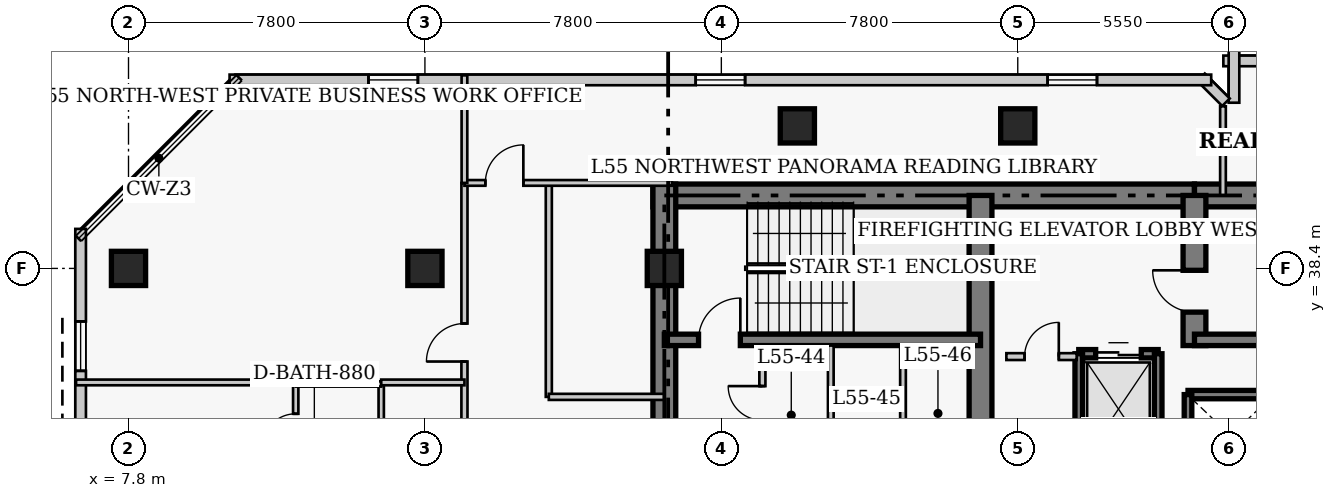
"""IFC4 building model, lengths in metres.
Left out: names, types, materials, properties, quantities, classifications, styles, units other than length and angle.
Written with IfcOpenShell. Run it as: python <this file> out.ifc"""

import sys

from ifc_helpers import new_model, si_unit, direction, frame, frame_2d, origin, origin_2d, place, context, subcontext, project, spatial, rectangle, extrude, element, fill, save


model = new_model("IFC4")
c1 = context("Model", 3, precision=1e-05, world=origin(), true_north=direction((0.0, 1.0)))
c2 = subcontext(c1, "Body", "Model", "MODEL_VIEW")
j1 = project(units=[si_unit("LENGTHUNIT", "METRE"), si_unit("PLANEANGLEUNIT", "RADIAN")], contexts=[c1])
p1 = place(None, origin())
s1 = spatial("IfcSite", under=j1, at=p1, CompositionType="ELEMENT")
p2 = place(p1, origin())
s2 = spatial("IfcBuilding", under=s1, at=p2, CompositionType="ELEMENT")
p3 = place(p2, frame((0.0, 0.0, 220.2)))
s3 = spatial("IfcBuildingStorey", under=s2, at=p3, CompositionType="ELEMENT", Elevation=220.2)
p4 = place(p3, frame((21.6, 40.32, 0.0), z_axis=(0.0, 0.0, 1.0), x_axis=(1.0, 0.0, 0.0)))
e1 = element("IfcWall", 1, at=p4, inside=s3, PredefinedType="SHEAR", context=c2, shape_type="SweptSolid", body=[
    extrude(rectangle(XDim=14.25, YDim=0.6, at=frame_2d((7.125, 0.0))), origin(), (0.0, 0.0, 1.0), 3.9),
])
p5 = place(p3, frame((35.85, 40.32, 0.0), z_axis=(0.0, 0.0, 1.0), x_axis=(1.0, 0.0, 0.0)))
e2 = element("IfcWall", 2, at=p5, inside=s3, PredefinedType="SHEAR", context=c2, shape_type="SweptSolid", body=[
    extrude(rectangle(XDim=12.6, YDim=0.6, at=frame_2d((6.3, 0.0))), origin(), (0.0, 0.0, 1.0), 3.9),
])
p6 = place(p3, frame((21.9, 27.05, 0.0), z_axis=(0.0, 0.0, 1.0), x_axis=(0.0, 1.0, 0.0)))
e3 = element("IfcWall", 3, at=p6, inside=s3, PredefinedType="SHEAR", context=c2, shape_type="SweptSolid", body=[
    extrude(rectangle(XDim=13.57, YDim=0.6, at=frame_2d((6.785, 0.0))), origin(), (0.0, 0.0, 1.0), 3.9),
])
p7 = place(p3, frame((30.22, 33.05, 0.0), z_axis=(0.0, 0.0, 1.0), x_axis=(0.0, 1.0, 0.0)))
e4 = element("IfcWall", 4, at=p7, inside=s3, PredefinedType="SHEAR", context=c2, shape_type="SweptSolid", body=[
    extrude(rectangle(XDim=7.27, YDim=0.6, at=frame_2d((3.635, 0.0))), origin(), (0.0, 0.0, 1.0), 3.9),
])
p8 = place(p3, frame((35.85, 36.37, 0.0), z_axis=(0.0, 0.0, 1.0), x_axis=(0.0, 1.0, 0.0)))
e5 = element("IfcWall", 5, at=p8, inside=s3, PredefinedType="SHEAR", context=c2, shape_type="SweptSolid", body=[
    extrude(rectangle(XDim=3.95, YDim=0.6, at=frame_2d((1.975, 0.0))), origin(), (0.0, 0.0, 1.0), 3.9),
])
p9 = place(p8, frame((0.88, 0.0, 0.0)))
e6 = element("IfcOpeningElement", 6, at=p9, cuts=e5, PredefinedType="OPENING", context=c2, shape_type="SweptSolid", body=[
    extrude(rectangle(XDim=1.1, YDim=2.15, at=frame_2d((0.55, 1.075))), frame((0.0, 0.31, 0.0), z_axis=(0.0, -1.0, 0.0), x_axis=(1.0, 0.0, 0.0)), (0.0, 0.0, 1.0), 0.62),
])
p10 = place(p3, frame((21.9, 36.52, 0.0), z_axis=(0.0, 0.0, 1.0), x_axis=(1.0, 0.0, 0.0)))
e7 = element("IfcWall", 7, at=p10, inside=s3, PredefinedType="SHEAR", context=c2, shape_type="SweptSolid", body=[
    extrude(rectangle(XDim=8.32, YDim=0.3, at=frame_2d((4.16, 0.0))), origin(), (0.0, 0.0, 1.0), 3.9),
])
p11 = place(p10, frame((0.9, 0.0, 0.0)))
e8 = element("IfcOpeningElement", 8, at=p11, cuts=e7, PredefinedType="OPENING", context=c2, shape_type="SweptSolid", body=[
    extrude(rectangle(XDim=1.1, YDim=2.15, at=frame_2d((0.55, 1.075))), frame((0.0, 0.16, 0.0), z_axis=(0.0, -1.0, 0.0), x_axis=(1.0, 0.0, 0.0)), (0.0, 0.0, 1.0), 0.32),
])
p12 = place(p3, frame((35.85, 36.52, 0.0), z_axis=(0.0, 0.0, 1.0), x_axis=(1.0, 0.0, 0.0)))
e9 = element("IfcWall", 9, at=p12, inside=s3, PredefinedType="SHEAR", context=c2, shape_type="SweptSolid", body=[
    extrude(rectangle(XDim=8.33, YDim=0.3, at=frame_2d((4.165, 0.0))), origin(), (0.0, 0.0, 1.0), 3.9),
])
for number, where, z_axis, x_axis in (
    (10, (7.8, 38.4, 0.0), (0.0, 0.0, 1.0), (1.0, 0.0, 0.0)),
    (11, (15.6, 38.4, 0.0), (0.0, 0.0, 1.0), (1.0, 0.0, 0.0)),
    (12, (21.9, 38.4, 0.0), (0.0, 0.0, 1.0), (1.0, 0.0, 0.0)),
    (13, (25.4, 42.15, 0.0), (0.0, 0.0, 1.0), (1.0, 0.0, 0.0)),
    (14, (31.2, 42.15, 0.0), (0.0, 0.0, 1.0), (1.0, 0.0, 0.0)),
):
    element("IfcColumn", number, at=place(p3, frame(where, z_axis=z_axis, x_axis=x_axis)), inside=s3, PredefinedType="COLUMN", context=c2, shape_type="SweptSolid", body=[
        extrude(rectangle(XDim=0.9, YDim=0.9, at=origin_2d()), origin(), (0.0, 0.0, 1.0), 3.9),
    ])
p13 = place(p3, frame((41.39, 43.86, 0.0), z_axis=(0.0, 0.0, 1.0), x_axis=(-1.0, 0.0, 0.0)))
e15 = element("IfcWall", 15, at=p13, inside=s3, PredefinedType="SOLIDWALL", context=c2, shape_type="SweptSolid", body=[
    extrude(rectangle(XDim=4.78, YDim=0.28, at=frame_2d((2.39, 0.0))), origin(), (0.0, 0.0, 1.0), 3.65),
])
p14 = place(p13, frame((1.74, 0.0, 0.85)))
e16 = element("IfcOpeningElement", 16, at=p14, cuts=e15, PredefinedType="OPENING", context=c2, shape_type="SweptSolid", body=[
    extrude(rectangle(XDim=1.3, YDim=1.7, at=frame_2d((0.65, 0.85))), frame((0.0, 0.15, 0.0), z_axis=(0.0, -1.0, 0.0), x_axis=(1.0, 0.0, 0.0)), (0.0, 0.0, 1.0), 0.3),
])
p15 = place(p3, frame((36.89, 44.14, 0.0), z_axis=(0.0, 0.0, 1.0), x_axis=(0.0, -1.0, 0.0)))
e17 = element("IfcWall", 17, at=p15, inside=s3, PredefinedType="SOLIDWALL", context=c2, shape_type="SweptSolid", body=[
    extrude(rectangle(XDim=1.38, YDim=0.28, at=frame_2d((0.69, 0.0))), origin(), (0.0, 0.0, 1.0), 3.65),
])
p16 = place(p3, frame((36.679, 42.773, 0.0), z_axis=(0.0, 0.0, 1.0), x_axis=(-0.707106781187, 0.707106781187, 0.0)))
e18 = element("IfcWall", 18, at=p16, inside=s3, PredefinedType="SOLIDWALL", context=c2, shape_type="SweptSolid", body=[
    extrude(rectangle(XDim=0.928, YDim=0.28, at=frame_2d((0.464, 0.0))), origin(), (0.0, 0.0, 1.0), 3.65),
])
p17 = place(p3, frame((36.29, 43.36, 0.0), z_axis=(0.0, 0.0, 1.0), x_axis=(-1.0, 0.0, 0.0)))
e19 = element("IfcWall", 19, at=p17, inside=s3, PredefinedType="SOLIDWALL", context=c2, shape_type="SweptSolid", body=[
    extrude(rectangle(XDim=25.83, YDim=0.28, at=frame_2d((12.915, 0.0))), origin(), (0.0, 0.0, 1.0), 3.65),
])
p18 = place(p17, frame((3.005, 0.0, 0.85)))
e20 = element("IfcOpeningElement", 20, at=p18, cuts=e19, PredefinedType="OPENING", context=c2, shape_type="SweptSolid", body=[
    extrude(rectangle(XDim=1.3, YDim=1.7, at=frame_2d((0.65, 0.85))), frame((0.0, 0.15, 0.0), z_axis=(0.0, -1.0, 0.0), x_axis=(1.0, 0.0, 0.0)), (0.0, 0.0, 1.0), 0.3),
])
p19 = place(p17, frame((12.265, 0.0, 0.85)))
e21 = element("IfcOpeningElement", 21, at=p19, cuts=e19, PredefinedType="OPENING", context=c2, shape_type="SweptSolid", body=[
    extrude(rectangle(XDim=1.3, YDim=1.7, at=frame_2d((0.65, 0.85))), frame((0.0, 0.15, 0.0), z_axis=(0.0, -1.0, 0.0), x_axis=(1.0, 0.0, 0.0)), (0.0, 0.0, 1.0), 0.3),
])
p20 = place(p17, frame((20.875, 0.0, 0.85)))
e22 = element("IfcOpeningElement", 22, at=p20, cuts=e19, PredefinedType="OPENING", context=c2, shape_type="SweptSolid", body=[
    extrude(rectangle(XDim=1.3, YDim=1.7, at=frame_2d((0.65, 0.85))), frame((0.0, 0.15, 0.0), z_axis=(0.0, -1.0, 0.0), x_axis=(1.0, 0.0, 0.0)), (0.0, 0.0, 1.0), 0.3),
])
p21 = place(p3, frame((6.54, 39.44, 0.0), z_axis=(0.0, 0.0, 1.0), x_axis=(0.0, -1.0, 0.0)))
e23 = element("IfcWall", 23, at=p21, inside=s3, PredefinedType="SOLIDWALL", context=c2, shape_type="SweptSolid", body=[
    extrude(rectangle(XDim=29.88, YDim=0.28, at=frame_2d((14.94, 0.0))), origin(), (0.0, 0.0, 1.0), 3.65),
])
p22 = place(p21, frame((2.435, 0.0, 0.85)))
e24 = element("IfcOpeningElement", 24, at=p22, cuts=e23, PredefinedType="OPENING", context=c2, shape_type="SweptSolid", body=[
    extrude(rectangle(XDim=1.3, YDim=1.7, at=frame_2d((0.65, 0.85))), frame((0.0, 0.15, 0.0), z_axis=(0.0, -1.0, 0.0), x_axis=(1.0, 0.0, 0.0)), (0.0, 0.0, 1.0), 0.3),
])
p23 = place(p21, frame((11.205, 0.0, 0.85)))
e25 = element("IfcOpeningElement", 25, at=p23, cuts=e23, PredefinedType="OPENING", context=c2, shape_type="SweptSolid", body=[
    extrude(rectangle(XDim=1.3, YDim=1.7, at=frame_2d((0.65, 0.85))), frame((0.0, 0.15, 0.0), z_axis=(0.0, -1.0, 0.0), x_axis=(1.0, 0.0, 0.0)), (0.0, 0.0, 1.0), 0.3),
])
p24 = place(p21, frame((17.375, 0.0, 0.85)))
e26 = element("IfcOpeningElement", 26, at=p24, cuts=e23, PredefinedType="OPENING", context=c2, shape_type="SweptSolid", body=[
    extrude(rectangle(XDim=1.3, YDim=1.7, at=frame_2d((0.65, 0.85))), frame((0.0, 0.15, 0.0), z_axis=(0.0, -1.0, 0.0), x_axis=(1.0, 0.0, 0.0)), (0.0, 0.0, 1.0), 0.3),
])
p25 = place(p21, frame((25.495, 0.0, 0.85)))
e27 = element("IfcOpeningElement", 27, at=p25, cuts=e23, PredefinedType="OPENING", context=c2, shape_type="SweptSolid", body=[
    extrude(rectangle(XDim=1.3, YDim=1.7, at=frame_2d((0.65, 0.85))), frame((0.0, 0.15, 0.0), z_axis=(0.0, -1.0, 0.0), x_axis=(1.0, 0.0, 0.0)), (0.0, 0.0, 1.0), 0.3),
])
p26 = place(p3, frame((35.68, 35.08, 0.0), z_axis=(0.0, 0.0, 1.0), x_axis=(1.0, 0.0, 0.0)))
e28 = element("IfcWall", 28, at=p26, inside=s3, PredefinedType="SHEAR", context=c2, shape_type="SweptSolid", body=[
    extrude(rectangle(XDim=2.32, YDim=0.22, at=frame_2d((1.16, 0.0))), origin(), (0.0, 0.0, 1.0), 3.9),
])
p27 = place(p3, frame((35.68, 32.92, 0.0), z_axis=(0.0, 0.0, 1.0), x_axis=(0.0, 1.0, 0.0)))
e29 = element("IfcWall", 29, at=p27, inside=s3, PredefinedType="SHEAR", context=c2, shape_type="SweptSolid", body=[
    extrude(rectangle(XDim=2.16, YDim=0.2, at=frame_2d((1.08, 0.0))), origin(), (0.0, 0.0, 1.0), 3.9),
])
p28 = place(p3, frame((32.805, 36.155, 0.0), z_axis=(0.0, 0.0, 1.0), x_axis=(1.0, 0.0, 0.0)))
e30 = element("IfcWall", 30, at=p28, inside=s3, PredefinedType="SHEAR", context=c2, shape_type="SweptSolid", body=[
    extrude(rectangle(XDim=2.09, YDim=0.22, at=frame_2d((1.045, 0.0))), origin(), (0.0, 0.0, 1.0), 3.9),
])
p29 = place(p28, frame((0.445, 0.0, 0.0)))
e31 = element("IfcOpeningElement", 31, at=p29, cuts=e30, PredefinedType="OPENING", context=c2, shape_type="SweptSolid", body=[
    extrude(rectangle(XDim=1.2, YDim=2.15, at=frame_2d((0.6, 1.075))), frame((0.0, 0.12, 0.0), z_axis=(0.0, -1.0, 0.0), x_axis=(1.0, 0.0, 0.0)), (0.0, 0.0, 1.0), 0.24),
])
for number, where, z_axis, x_axis in (
    (32, (32.805, 33.245, 0.0), (0.0, 0.0, 1.0), (0.0, 1.0, 0.0)),
    (33, (34.895, 33.245, 0.0), (0.0, 0.0, 1.0), (0.0, 1.0, 0.0)),
):
    element("IfcWall", number, at=place(p3, frame(where, z_axis=z_axis, x_axis=x_axis)), inside=s3, PredefinedType="SHEAR", context=c2, shape_type="SweptSolid", body=[
        extrude(rectangle(XDim=2.91, YDim=0.2, at=frame_2d((1.455, 0.0))), origin(), (0.0, 0.0, 1.0), 3.9),
    ])
p30 = place(p3, frame((30.9, 36.08, 0.0), z_axis=(0.0, 0.0, 1.0), x_axis=(1.0, 0.0, 0.0)))
e34 = element("IfcWall", 34, at=p30, inside=s3, PredefinedType="PARTITIONING", context=c2, shape_type="SweptSolid", body=[
    extrude(rectangle(XDim=1.85, YDim=0.18, at=frame_2d((0.925, 0.0))), origin(), (0.0, 0.0, 1.0), 3.65),
])
p31 = place(p30, frame((0.48, 0.0, 0.0)))
e35 = element("IfcOpeningElement", 35, at=p31, cuts=e34, PredefinedType="OPENING", context=c2, shape_type="SweptSolid", body=[
    extrude(rectangle(XDim=0.9, YDim=2.15, at=frame_2d((0.45, 1.075))), frame((0.0, 0.1, 0.0), z_axis=(0.0, -1.0, 0.0), x_axis=(1.0, 0.0, 0.0)), (0.0, 0.0, 1.0), 0.2),
])
p32 = place(p3, frame((24.48, 32.8, 0.0), z_axis=(0.0, 0.0, 1.0), x_axis=(0.0, 1.0, 0.0)))
e36 = element("IfcWall", 36, at=p32, inside=s3, PredefinedType="PARTITIONING", context=c2, shape_type="SweptSolid", body=[
    extrude(rectangle(XDim=3.57, YDim=0.16, at=frame_2d((1.785, 0.0))), origin(), (0.0, 0.0, 1.0), 3.65),
])
p33 = place(p32, frame((1.604, 0.0, 0.0)))
e37 = element("IfcOpeningElement", 37, at=p33, cuts=e36, PredefinedType="OPENING", context=c2, shape_type="SweptSolid", body=[
    extrude(rectangle(XDim=0.9, YDim=2.1, at=frame_2d((0.45, 1.05))), frame((0.0, 0.09, 0.0), z_axis=(0.0, -1.0, 0.0), x_axis=(1.0, 0.0, 0.0)), (0.0, 0.0, 1.0), 0.18),
])
for number, where, z_axis, x_axis in (
    (38, (26.28, 32.75, 0.0), (0.0, 0.0, 1.0), (0.0, 1.0, 0.0)),
    (39, (28.18, 32.75, 0.0), (0.0, 0.0, 1.0), (0.0, 1.0, 0.0)),
):
    element("IfcWall", number, at=place(p3, frame(where, z_axis=z_axis, x_axis=x_axis)), inside=s3, PredefinedType="PARTITIONING", context=c2, shape_type="SweptSolid", body=[
        extrude(rectangle(XDim=3.62, YDim=0.15, at=frame_2d((1.81, 0.0))), origin(), (0.0, 0.0, 1.0), 3.65),
    ])
p34 = place(p3, frame((16.64, 7.55, 0.0), z_axis=(0.0, 0.0, 1.0), x_axis=(0.0, 1.0, 0.0)))
e40 = element("IfcWall", 40, at=p34, inside=s3, PredefinedType="PARTITIONING", context=c2, shape_type="SweptSolid", body=[
    extrude(rectangle(XDim=33.1, YDim=0.16, at=frame_2d((16.55, 0.0))), origin(), (0.0, 0.0, 1.0), 3.65),
])
p35 = place(p34, frame((0.46, 0.0, 0.0)))
e41 = element("IfcOpeningElement", 41, at=p35, cuts=e40, PredefinedType="OPENING", context=c2, shape_type="SweptSolid", body=[
    extrude(rectangle(XDim=0.95, YDim=2.1, at=frame_2d((0.475, 1.05))), frame((0.0, 0.09, 0.0), z_axis=(0.0, -1.0, 0.0), x_axis=(1.0, 0.0, 0.0)), (0.0, 0.0, 1.0), 0.18),
])
p36 = place(p34, frame((7.575, 0.0, 0.0)))
e42 = element("IfcOpeningElement", 42, at=p36, cuts=e40, PredefinedType="OPENING", context=c2, shape_type="SweptSolid", body=[
    extrude(rectangle(XDim=0.95, YDim=2.1, at=frame_2d((0.475, 1.05))), frame((0.0, 0.09, 0.0), z_axis=(0.0, -1.0, 0.0), x_axis=(1.0, 0.0, 0.0)), (0.0, 0.0, 1.0), 0.18),
])
p37 = place(p34, frame((14.178, 0.0, 0.0)))
e43 = element("IfcOpeningElement", 43, at=p37, cuts=e40, PredefinedType="OPENING", context=c2, shape_type="SweptSolid", body=[
    extrude(rectangle(XDim=0.95, YDim=2.1, at=frame_2d((0.475, 1.05))), frame((0.0, 0.09, 0.0), z_axis=(0.0, -1.0, 0.0), x_axis=(1.0, 0.0, 0.0)), (0.0, 0.0, 1.0), 0.18),
])
p38 = place(p34, frame((28.4, 0.0, 0.0)))
e44 = element("IfcOpeningElement", 44, at=p38, cuts=e40, PredefinedType="OPENING", context=c2, shape_type="SweptSolid", body=[
    extrude(rectangle(XDim=1.0, YDim=2.15, at=frame_2d((0.5, 1.075))), frame((0.0, 0.09, 0.0), z_axis=(0.0, -1.0, 0.0), x_axis=(1.0, 0.0, 0.0)), (0.0, 0.0, 1.0), 0.18),
])
p39 = place(p3, frame((18.86, 35.02, 0.0), z_axis=(0.0, 0.0, 1.0), x_axis=(0.0, 1.0, 0.0)))
e45 = element("IfcWall", 45, at=p39, inside=s3, PredefinedType="PARTITIONING", context=c2, shape_type="SweptSolid", body=[
    extrude(rectangle(XDim=5.63, YDim=0.16, at=frame_2d((2.815, 0.0))), origin(), (0.0, 0.0, 1.0), 3.65),
])
p40 = place(p3, frame((18.86, 35.02, 0.0), z_axis=(0.0, 0.0, 1.0), x_axis=(1.0, 0.0, 0.0)))
e46 = element("IfcWall", 46, at=p40, inside=s3, PredefinedType="PARTITIONING", context=c2, shape_type="SweptSolid", body=[
    extrude(rectangle(XDim=3.04, YDim=0.16, at=frame_2d((1.52, 0.0))), origin(), (0.0, 0.0, 1.0), 3.65),
])
p41 = place(p3, frame((16.64, 40.65, 0.0), z_axis=(0.0, 0.0, 1.0), x_axis=(1.0, 0.0, 0.0)))
e47 = element("IfcWall", 47, at=p41, inside=s3, PredefinedType="PARTITIONING", context=c2, shape_type="SweptSolid", body=[
    extrude(rectangle(XDim=5.46, YDim=0.15, at=frame_2d((2.73, 0.0))), origin(), (0.0, 0.0, 1.0), 3.65),
])
p42 = place(p41, frame((0.55, 0.0, 0.0)))
e48 = element("IfcOpeningElement", 48, at=p42, cuts=e47, PredefinedType="OPENING", context=c2, shape_type="SweptSolid", body=[
    extrude(rectangle(XDim=1.0, YDim=2.15, at=frame_2d((0.5, 1.075))), frame((0.0, 0.085, 0.0), z_axis=(0.0, -1.0, 0.0), x_axis=(1.0, 0.0, 0.0)), (0.0, 0.0, 1.0), 0.17),
])
p43 = place(p3, frame((16.64, 40.65, 0.0), z_axis=(0.0, 0.0, 1.0), x_axis=(0.0, 1.0, 0.0)))
e49 = element("IfcWall", 49, at=p43, inside=s3, PredefinedType="PARTITIONING", context=c2, shape_type="SweptSolid", body=[
    extrude(rectangle(XDim=2.83, YDim=0.15, at=frame_2d((1.415, 0.0))), origin(), (0.0, 0.0, 1.0), 3.65),
])
p44 = place(p3, frame((36.6, 40.32, 0.0), z_axis=(0.0, 0.0, 1.0), x_axis=(0.0, 1.0, 0.0)))
e50 = element("IfcWall", 50, at=p44, inside=s3, PredefinedType="PARTITIONING", context=c2, shape_type="SweptSolid", body=[
    extrude(rectangle(XDim=2.345, YDim=0.15, at=frame_2d((1.172, 0.0))), origin(), (0.0, 0.0, 1.0), 3.65),
])
p45 = place(p3, frame((12.2, 32.91, 0.0), z_axis=(0.0, 0.0, 1.0), x_axis=(0.0, 1.0, 0.0)))
e51 = element("IfcWall", 51, at=p45, inside=s3, PredefinedType="PLUMBINGWALL", context=c2, shape_type="SweptSolid", body=[
    extrude(rectangle(XDim=2.45, YDim=0.14, at=frame_2d((1.225, 0.0))), origin(), (0.0, 0.0, 1.0), 3.65),
])
p46 = place(p45, frame((0.785, 0.0, 0.0)))
e52 = element("IfcOpeningElement", 52, at=p46, cuts=e51, PredefinedType="OPENING", context=c2, shape_type="SweptSolid", body=[
    extrude(rectangle(XDim=0.88, YDim=2.05, at=frame_2d((0.44, 1.025))), frame((0.0, 0.08, 0.0), z_axis=(0.0, -1.0, 0.0), x_axis=(1.0, 0.0, 0.0)), (0.0, 0.0, 1.0), 0.16),
])
p47 = place(p3, frame((14.45, 32.91, 0.0), z_axis=(0.0, 0.0, 1.0), x_axis=(0.0, 1.0, 0.0)))
e53 = element("IfcWall", 53, at=p47, inside=s3, PredefinedType="PLUMBINGWALL", context=c2, shape_type="SweptSolid", body=[
    extrude(rectangle(XDim=2.45, YDim=0.14, at=frame_2d((1.225, 0.0))), origin(), (0.0, 0.0, 1.0), 3.65),
])
p48 = place(p3, frame((12.2, 35.36, 0.0), z_axis=(0.0, 0.0, 1.0), x_axis=(1.0, 0.0, 0.0)))
e54 = element("IfcWall", 54, at=p48, inside=s3, PredefinedType="PLUMBINGWALL", context=c2, shape_type="SweptSolid", body=[
    extrude(rectangle(XDim=2.25, YDim=0.14, at=frame_2d((1.125, 0.0))), origin(), (0.0, 0.0, 1.0), 3.65),
])
p49 = place(p3, frame((6.42, 35.4, 0.0), z_axis=(0.0, 0.0, 1.0), x_axis=(1.0, 0.0, 0.0)))
e55 = element("IfcWall", 55, at=p49, inside=s3, PredefinedType="PARTITIONING", context=c2, shape_type="SweptSolid", body=[
    extrude(rectangle(XDim=5.78, YDim=0.15, at=frame_2d((2.89, 0.0))), origin(), (0.0, 0.0, 1.0), 3.65),
])
p50 = place(p3, frame((14.45, 35.4, 0.0), z_axis=(0.0, 0.0, 1.0), x_axis=(1.0, 0.0, 0.0)))
e56 = element("IfcWall", 56, at=p50, inside=s3, PredefinedType="PARTITIONING", context=c2, shape_type="SweptSolid", body=[
    extrude(rectangle(XDim=2.19, YDim=0.15, at=frame_2d((1.095, 0.0))), origin(), (0.0, 0.0, 1.0), 3.65),
])
p51 = place(p18, origin())
e57 = element("IfcWindow", 57, at=p51, inside=s3, PartitioningType="SINGLE_PANEL", PredefinedType="WINDOW", context=c2, shape_type="SweptSolid", body=[
    extrude(rectangle(XDim=1.3, YDim=1.7, at=frame_2d((0.65, 0.85))), frame((0.0, 0.03, 0.0), z_axis=(0.0, -1.0, 0.0), x_axis=(1.0, 0.0, 0.0)), (0.0, 0.0, 1.0), 0.06),
])
fill(e20, e57)
p52 = place(p19, origin())
e58 = element("IfcWindow", 58, at=p52, inside=s3, PartitioningType="SINGLE_PANEL", PredefinedType="WINDOW", context=c2, shape_type="SweptSolid", body=[
    extrude(rectangle(XDim=1.3, YDim=1.7, at=frame_2d((0.65, 0.85))), frame((0.0, 0.03, 0.0), z_axis=(0.0, -1.0, 0.0), x_axis=(1.0, 0.0, 0.0)), (0.0, 0.0, 1.0), 0.06),
])
fill(e21, e58)
p53 = place(p20, origin())
e59 = element("IfcWindow", 59, at=p53, inside=s3, PartitioningType="SINGLE_PANEL", PredefinedType="WINDOW", context=c2, shape_type="SweptSolid", body=[
    extrude(rectangle(XDim=1.3, YDim=1.7, at=frame_2d((0.65, 0.85))), frame((0.0, 0.03, 0.0), z_axis=(0.0, -1.0, 0.0), x_axis=(1.0, 0.0, 0.0)), (0.0, 0.0, 1.0), 0.06),
])
fill(e22, e59)
p54 = place(p22, origin())
e60 = element("IfcWindow", 60, at=p54, inside=s3, PartitioningType="SINGLE_PANEL", PredefinedType="WINDOW", context=c2, shape_type="SweptSolid", body=[
    extrude(rectangle(XDim=1.3, YDim=1.7, at=frame_2d((0.65, 0.85))), frame((0.0, 0.03, 0.0), z_axis=(0.0, -1.0, 0.0), x_axis=(1.0, 0.0, 0.0)), (0.0, 0.0, 1.0), 0.06),
])
fill(e24, e60)
p55 = place(p29, origin())
e61 = element("IfcDoor", 61, at=p55, inside=s3, OperationType="DOUBLE_DOOR_SLIDING", PredefinedType="DOOR", context=c2, shape_type="SweptSolid", body=[
    extrude(rectangle(XDim=1.2, YDim=2.15, at=frame_2d((0.6, 1.075))), frame((0.0, 0.025, 0.0), z_axis=(0.0, -1.0, 0.0), x_axis=(1.0, 0.0, 0.0)), (0.0, 0.0, 1.0), 0.05),
])
fill(e31, e61)
p56 = place(p31, origin())
e62 = element("IfcDoor", 62, at=p56, inside=s3, OperationType="SINGLE_SWING_RIGHT", PredefinedType="DOOR", context=c2, shape_type="SweptSolid", body=[
    extrude(rectangle(XDim=0.9, YDim=2.15, at=frame_2d((0.45, 1.075))), frame((0.0, 0.025, 0.0), z_axis=(0.0, -1.0, 0.0), x_axis=(1.0, 0.0, 0.0)), (0.0, 0.0, 1.0), 0.05),
])
fill(e35, e62)
p57 = place(p33, origin())
e63 = element("IfcDoor", 63, at=p57, inside=s3, OperationType="SINGLE_SWING_RIGHT", PredefinedType="DOOR", context=c2, shape_type="SweptSolid", body=[
    extrude(rectangle(XDim=0.9, YDim=2.1, at=frame_2d((0.45, 1.05))), frame((0.0, 0.025, 0.0), z_axis=(0.0, -1.0, 0.0), x_axis=(1.0, 0.0, 0.0)), (0.0, 0.0, 1.0), 0.05),
])
fill(e37, e63)
p58 = place(p42, origin())
e64 = element("IfcDoor", 64, at=p58, inside=s3, OperationType="SINGLE_SWING_RIGHT", PredefinedType="DOOR", context=c2, shape_type="SweptSolid", body=[
    extrude(rectangle(XDim=1.0, YDim=2.15, at=frame_2d((0.5, 1.075))), frame((0.0, 0.025, 0.0), z_axis=(0.0, -1.0, 0.0), x_axis=(1.0, 0.0, 0.0)), (0.0, 0.0, 1.0), 0.05),
])
fill(e48, e64)
p59 = place(p46, origin())
e65 = element("IfcDoor", 65, at=p59, inside=s3, OperationType="SINGLE_SWING_LEFT", PredefinedType="DOOR", context=c2, shape_type="SweptSolid", body=[
    extrude(rectangle(XDim=0.88, YDim=2.05, at=frame_2d((0.44, 1.025))), frame((0.0, 0.025, 0.0), z_axis=(0.0, -1.0, 0.0), x_axis=(1.0, 0.0, 0.0)), (0.0, 0.0, 1.0), 0.05),
])
fill(e52, e65)
p60 = place(p38, origin())
e66 = element("IfcDoor", 66, at=p60, inside=s3, OperationType="SINGLE_SWING_LEFT", PredefinedType="DOOR", context=c2, shape_type="SweptSolid", body=[
    extrude(rectangle(XDim=1.0, YDim=2.15, at=frame_2d((0.5, 1.075))), frame((0.0, 0.025, 0.0), z_axis=(0.0, -1.0, 0.0), x_axis=(1.0, 0.0, 0.0)), (0.0, 0.0, 1.0), 0.05),
])
fill(e44, e66)
p61 = place(p11, origin())
e67 = element("IfcDoor", 67, at=p61, inside=s3, OperationType="SINGLE_SWING_RIGHT", PredefinedType="DOOR", context=c2, shape_type="SweptSolid", body=[
    extrude(rectangle(XDim=1.1, YDim=2.15, at=frame_2d((0.55, 1.075))), frame((0.0, 0.025, 0.0), z_axis=(0.0, -1.0, 0.0), x_axis=(1.0, 0.0, 0.0)), (0.0, 0.0, 1.0), 0.05),
])
fill(e8, e67)
p62 = place(p9, origin())
e68 = element("IfcDoor", 68, at=p62, inside=s3, OperationType="SINGLE_SWING_RIGHT", PredefinedType="DOOR", context=c2, shape_type="SweptSolid", body=[
    extrude(rectangle(XDim=1.1, YDim=2.15, at=frame_2d((0.55, 1.075))), frame((0.0, 0.025, 0.0), z_axis=(0.0, -1.0, 0.0), x_axis=(1.0, 0.0, 0.0)), (0.0, 0.0, 1.0), 0.05),
])
fill(e6, e68)
save(model, sys.argv[1])
